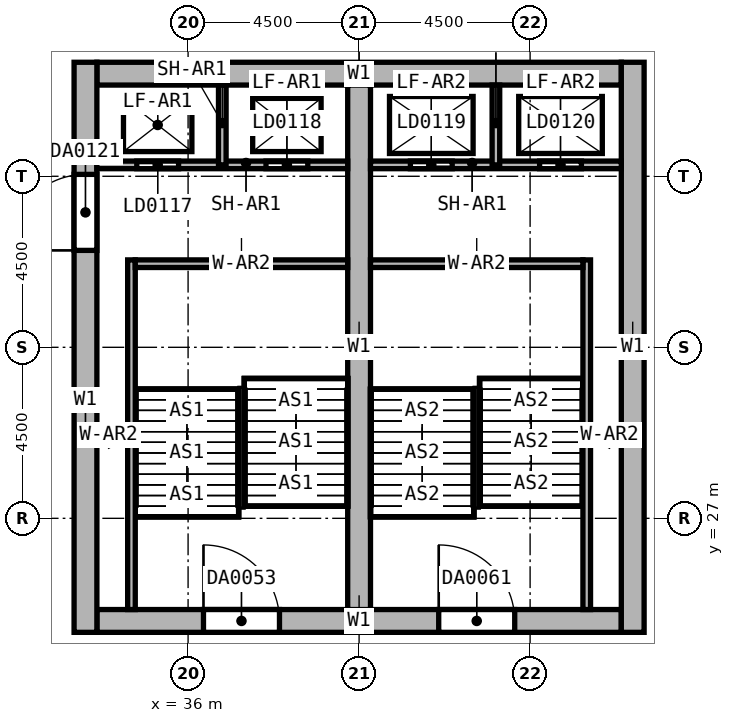
"""IFC4 building model, lengths in metres.
Left out: names, types, materials, properties, quantities, classifications, styles, units other than length and angle.
Written with IfcOpenShell. Run it as: python <this file> out.ifc"""

import sys

from ifc_helpers import new_model, si_unit, direction, frame, frame_2d, origin, place, context, subcontext, project, spatial, rectangle, extrude, element, fill, save


model = new_model("IFC4")
c1 = context("Model", 3, precision=1e-05, world=origin(), true_north=direction((0.0, 1.0)))
c2 = subcontext(c1, "Body", "Model", "MODEL_VIEW")
j1 = project(units=[si_unit("LENGTHUNIT", "METRE"), si_unit("PLANEANGLEUNIT", "RADIAN")], contexts=[c1])
p1 = place(None, origin())
s1 = spatial("IfcSite", under=j1, at=p1, CompositionType="ELEMENT")
p2 = place(p1, origin())
s2 = spatial("IfcBuilding", under=s1, at=p2, CompositionType="ELEMENT")
p3 = place(p2, origin())
s3 = spatial("IfcBuildingStorey", under=s2, at=p3, CompositionType="ELEMENT", Elevation=0.0)
p4 = place(p3, frame((33.6, 38.7, 0.0), z_axis=(0.0, 0.0, 1.0), x_axis=(1.0, 0.0, 0.0)))
e1 = element("IfcWall", 1, at=p4, inside=s3, PredefinedType="SHEAR", context=c2, shape_type="SweptSolid", body=[
    extrude(rectangle(XDim=13.8, YDim=0.6, at=frame_2d((6.9, 0.0))), origin(), (0.0, 0.0, 1.0), 12.0),
])
p5 = place(p3, frame((33.6, 24.3, 0.0), z_axis=(0.0, 0.0, 1.0), x_axis=(1.0, 0.0, 0.0)))
e2 = element("IfcWall", 2, at=p5, inside=s3, PredefinedType="SHEAR", context=c2, shape_type="SweptSolid", body=[
    extrude(rectangle(XDim=13.8, YDim=0.6, at=frame_2d((6.9, 0.0))), origin(), (0.0, 0.0, 1.0), 12.0),
])
p6 = place(p5, frame((2.805, 0.0, 0.0)))
e3 = element("IfcOpeningElement", 3, at=p6, cuts=e2, PredefinedType="OPENING", context=c2, shape_type="SweptSolid", body=[
    extrude(rectangle(XDim=2.0, YDim=2.4, at=frame_2d((1.0, 1.2))), frame((0.0, 0.3, 0.0), z_axis=(0.0, -1.0, 0.0), x_axis=(1.0, 0.0, 0.0)), (0.0, 0.0, 1.0), 0.6),
])
p7 = place(p5, frame((8.995, 0.0, 0.0)))
e4 = element("IfcOpeningElement", 4, at=p7, cuts=e2, PredefinedType="OPENING", context=c2, shape_type="SweptSolid", body=[
    extrude(rectangle(XDim=2.0, YDim=2.4, at=frame_2d((1.0, 1.2))), frame((0.0, 0.3, 0.0), z_axis=(0.0, -1.0, 0.0), x_axis=(1.0, 0.0, 0.0)), (0.0, 0.0, 1.0), 0.6),
])
p8 = place(p3, frame((33.3, 24.0, 0.0), z_axis=(0.0, 0.0, 1.0), x_axis=(0.0, 1.0, 0.0)))
e5 = element("IfcWall", 5, at=p8, inside=s3, PredefinedType="SHEAR", context=c2, shape_type="SweptSolid", body=[
    extrude(rectangle(XDim=15.0, YDim=0.6, at=frame_2d((7.5, 0.0))), origin(), (0.0, 0.0, 1.0), 12.0),
])
p9 = place(p8, frame((10.05, 0.0, 0.0)))
e6 = element("IfcOpeningElement", 6, at=p9, cuts=e5, PredefinedType="OPENING", context=c2, shape_type="SweptSolid", body=[
    extrude(rectangle(XDim=2.0, YDim=2.4, at=frame_2d((1.0, 1.2))), frame((0.0, 0.3, 0.0), z_axis=(0.0, -1.0, 0.0), x_axis=(1.0, 0.0, 0.0)), (0.0, 0.0, 1.0), 0.6),
])
p10 = place(p3, frame((47.7, 24.0, 0.0), z_axis=(0.0, 0.0, 1.0), x_axis=(0.0, 1.0, 0.0)))
e7 = element("IfcWall", 7, at=p10, inside=s3, PredefinedType="SHEAR", context=c2, shape_type="SweptSolid", body=[
    extrude(rectangle(XDim=15.0, YDim=0.6, at=frame_2d((7.5, 0.0))), origin(), (0.0, 0.0, 1.0), 12.0),
])
p11 = place(p3, frame((40.5, 24.6, 0.0), z_axis=(0.0, 0.0, 1.0), x_axis=(0.0, 1.0, 0.0)))
e8 = element("IfcWall", 8, at=p11, inside=s3, PredefinedType="SHEAR", context=c2, shape_type="SweptSolid", body=[
    extrude(rectangle(XDim=13.8, YDim=0.6, at=frame_2d((6.9, 0.0))), origin(), (0.0, 0.0, 1.0), 12.0),
])
p12 = place(p3, frame((34.51, 24.6, 0.0), z_axis=(0.0, 0.0, 1.0), x_axis=(0.0, 1.0, 0.0)))
e9 = element("IfcWall", 9, at=p12, inside=s3, PredefinedType="SOLIDWALL", context=c2, shape_type="SweptSolid", body=[
    extrude(rectangle(XDim=9.2, YDim=0.2, at=frame_2d((4.6, 0.0))), origin(), (0.0, 0.0, 1.0), 12.0),
])
p13 = place(p3, frame((34.61, 33.7, 0.0), z_axis=(0.0, 0.0, 1.0), x_axis=(1.0, 0.0, 0.0)))
e10 = element("IfcWall", 10, at=p13, inside=s3, PredefinedType="SOLIDWALL", context=c2, shape_type="SweptSolid", body=[
    extrude(rectangle(XDim=5.59, YDim=0.2, at=frame_2d((2.795, 0.0))), origin(), (0.0, 0.0, 1.0), 12.0),
])
p14 = place(p3, frame((46.49, 24.6, 0.0), z_axis=(0.0, 0.0, 1.0), x_axis=(0.0, 1.0, 0.0)))
e11 = element("IfcWall", 11, at=p14, inside=s3, PredefinedType="SOLIDWALL", context=c2, shape_type="SweptSolid", body=[
    extrude(rectangle(XDim=9.2, YDim=0.2, at=frame_2d((4.6, 0.0))), origin(), (0.0, 0.0, 1.0), 12.0),
])
p15 = place(p3, frame((40.8, 33.7, 0.0), z_axis=(0.0, 0.0, 1.0), x_axis=(1.0, 0.0, 0.0)))
e12 = element("IfcWall", 12, at=p15, inside=s3, PredefinedType="SOLIDWALL", context=c2, shape_type="SweptSolid", body=[
    extrude(rectangle(XDim=5.59, YDim=0.2, at=frame_2d((2.795, 0.0))), origin(), (0.0, 0.0, 1.0), 12.0),
])
p16 = place(p3, frame((33.6, 36.3, 0.0), z_axis=(0.0, 0.0, 1.0), x_axis=(1.0, 0.0, 0.0)))
e13 = element("IfcWall", 13, at=p16, inside=s3, PredefinedType="SHEAR", context=c2, shape_type="SweptSolid", body=[
    extrude(rectangle(XDim=6.6, YDim=0.2, at=frame_2d((3.3, 0.0))), origin(), (0.0, 0.0, 1.0), 12.0),
])
p17 = place(p16, frame((1.05, 0.0, 0.0)))
e14 = element("IfcOpeningElement", 14, at=p17, cuts=e13, PredefinedType="OPENING", context=c2, shape_type="SweptSolid", body=[
    extrude(rectangle(XDim=1.1, YDim=2.4, at=frame_2d((0.55, 1.2))), frame((0.0, 0.1, 0.0), z_axis=(0.0, -1.0, 0.0), x_axis=(1.0, 0.0, 0.0)), (0.0, 0.0, 1.0), 0.2),
])
p18 = place(p16, frame((4.45, 0.0, 0.0)))
e15 = element("IfcOpeningElement", 15, at=p18, cuts=e13, PredefinedType="OPENING", context=c2, shape_type="SweptSolid", body=[
    extrude(rectangle(XDim=1.1, YDim=2.4, at=frame_2d((0.55, 1.2))), frame((0.0, 0.1, 0.0), z_axis=(0.0, -1.0, 0.0), x_axis=(1.0, 0.0, 0.0)), (0.0, 0.0, 1.0), 0.2),
])
p19 = place(p3, frame((40.8, 36.3, 0.0), z_axis=(0.0, 0.0, 1.0), x_axis=(1.0, 0.0, 0.0)))
e16 = element("IfcWall", 16, at=p19, inside=s3, PredefinedType="SHEAR", context=c2, shape_type="SweptSolid", body=[
    extrude(rectangle(XDim=6.6, YDim=0.2, at=frame_2d((3.3, 0.0))), origin(), (0.0, 0.0, 1.0), 12.0),
])
p20 = place(p19, frame((1.05, 0.0, 0.0)))
e17 = element("IfcOpeningElement", 17, at=p20, cuts=e16, PredefinedType="OPENING", context=c2, shape_type="SweptSolid", body=[
    extrude(rectangle(XDim=1.1, YDim=2.4, at=frame_2d((0.55, 1.2))), frame((0.0, 0.1, 0.0), z_axis=(0.0, -1.0, 0.0), x_axis=(1.0, 0.0, 0.0)), (0.0, 0.0, 1.0), 0.2),
])
p21 = place(p19, frame((4.45, 0.0, 0.0)))
e18 = element("IfcOpeningElement", 18, at=p21, cuts=e16, PredefinedType="OPENING", context=c2, shape_type="SweptSolid", body=[
    extrude(rectangle(XDim=1.1, YDim=2.4, at=frame_2d((0.55, 1.2))), frame((0.0, 0.1, 0.0), z_axis=(0.0, -1.0, 0.0), x_axis=(1.0, 0.0, 0.0)), (0.0, 0.0, 1.0), 0.2),
])
for number, where, z_axis, x_axis in (
    (19, (36.9, 36.3, 0.0), (0.0, 0.0, 1.0), (0.0, 1.0, 0.0)),
    (20, (44.1, 36.3, 0.0), (0.0, 0.0, 1.0), (0.0, 1.0, 0.0)),
):
    element("IfcWall", number, at=place(p3, frame(where, z_axis=z_axis, x_axis=x_axis)), inside=s3, PredefinedType="SHEAR", context=c2, shape_type="SweptSolid", body=[
        extrude(rectangle(XDim=2.1, YDim=0.2, at=frame_2d((1.05, 0.0))), origin(), (0.0, 0.0, 1.0), 12.0),
    ])
p22 = place(p6, frame((2.0, 0.0, 0.0), z_axis=(0.0, 0.0, 1.0), x_axis=(-1.0, 0.0, 0.0)))
e21 = element("IfcDoor", 21, at=p22, inside=s3, OperationType="DOUBLE_DOOR_SINGLE_SWING", PredefinedType="DOOR", context=c2, shape_type="SweptSolid", body=[
    extrude(rectangle(XDim=2.0, YDim=2.4, at=frame_2d((1.0, 1.2))), frame((0.0, 0.025, 0.0), z_axis=(0.0, -1.0, 0.0), x_axis=(1.0, 0.0, 0.0)), (0.0, 0.0, 1.0), 0.05),
])
fill(e3, e21)
p23 = place(p7, frame((2.0, 0.0, 0.0), z_axis=(0.0, 0.0, 1.0), x_axis=(-1.0, 0.0, 0.0)))
e22 = element("IfcDoor", 22, at=p23, inside=s3, OperationType="DOUBLE_DOOR_SINGLE_SWING", PredefinedType="DOOR", context=c2, shape_type="SweptSolid", body=[
    extrude(rectangle(XDim=2.0, YDim=2.4, at=frame_2d((1.0, 1.2))), frame((0.0, 0.025, 0.0), z_axis=(0.0, -1.0, 0.0), x_axis=(1.0, 0.0, 0.0)), (0.0, 0.0, 1.0), 0.05),
])
fill(e4, e22)
p24 = place(p17, origin())
e23 = element("IfcDoor", 23, at=p24, inside=s3, OperationType="DOUBLE_DOOR_SLIDING", PredefinedType="DOOR", context=c2, shape_type="SweptSolid", body=[
    extrude(rectangle(XDim=1.1, YDim=2.4, at=frame_2d((0.55, 1.2))), frame((0.0, 0.025, 0.0), z_axis=(0.0, -1.0, 0.0), x_axis=(1.0, 0.0, 0.0)), (0.0, 0.0, 1.0), 0.05),
])
fill(e14, e23)
p25 = place(p18, origin())
e24 = element("IfcDoor", 24, at=p25, inside=s3, OperationType="DOUBLE_DOOR_SLIDING", PredefinedType="DOOR", context=c2, shape_type="SweptSolid", body=[
    extrude(rectangle(XDim=1.1, YDim=2.4, at=frame_2d((0.55, 1.2))), frame((0.0, 0.025, 0.0), z_axis=(0.0, -1.0, 0.0), x_axis=(1.0, 0.0, 0.0)), (0.0, 0.0, 1.0), 0.05),
])
fill(e15, e24)
p26 = place(p20, origin())
e25 = element("IfcDoor", 25, at=p26, inside=s3, OperationType="DOUBLE_DOOR_SLIDING", PredefinedType="DOOR", context=c2, shape_type="SweptSolid", body=[
    extrude(rectangle(XDim=1.1, YDim=2.4, at=frame_2d((0.55, 1.2))), frame((0.0, 0.025, 0.0), z_axis=(0.0, -1.0, 0.0), x_axis=(1.0, 0.0, 0.0)), (0.0, 0.0, 1.0), 0.05),
])
fill(e17, e25)
p27 = place(p21, origin())
e26 = element("IfcDoor", 26, at=p27, inside=s3, OperationType="DOUBLE_DOOR_SLIDING", PredefinedType="DOOR", context=c2, shape_type="SweptSolid", body=[
    extrude(rectangle(XDim=1.1, YDim=2.4, at=frame_2d((0.55, 1.2))), frame((0.0, 0.025, 0.0), z_axis=(0.0, -1.0, 0.0), x_axis=(1.0, 0.0, 0.0)), (0.0, 0.0, 1.0), 0.05),
])
fill(e18, e26)
p28 = place(p9, origin())
e27 = element("IfcDoor", 27, at=p28, inside=s3, OperationType="DOUBLE_DOOR_SINGLE_SWING", PredefinedType="DOOR", context=c2, shape_type="SweptSolid", body=[
    extrude(rectangle(XDim=2.0, YDim=2.4, at=frame_2d((1.0, 1.2))), frame((0.0, 0.025, 0.0), z_axis=(0.0, -1.0, 0.0), x_axis=(1.0, 0.0, 0.0)), (0.0, 0.0, 1.0), 0.05),
])
fill(e6, e27)
save(model, sys.argv[1])
